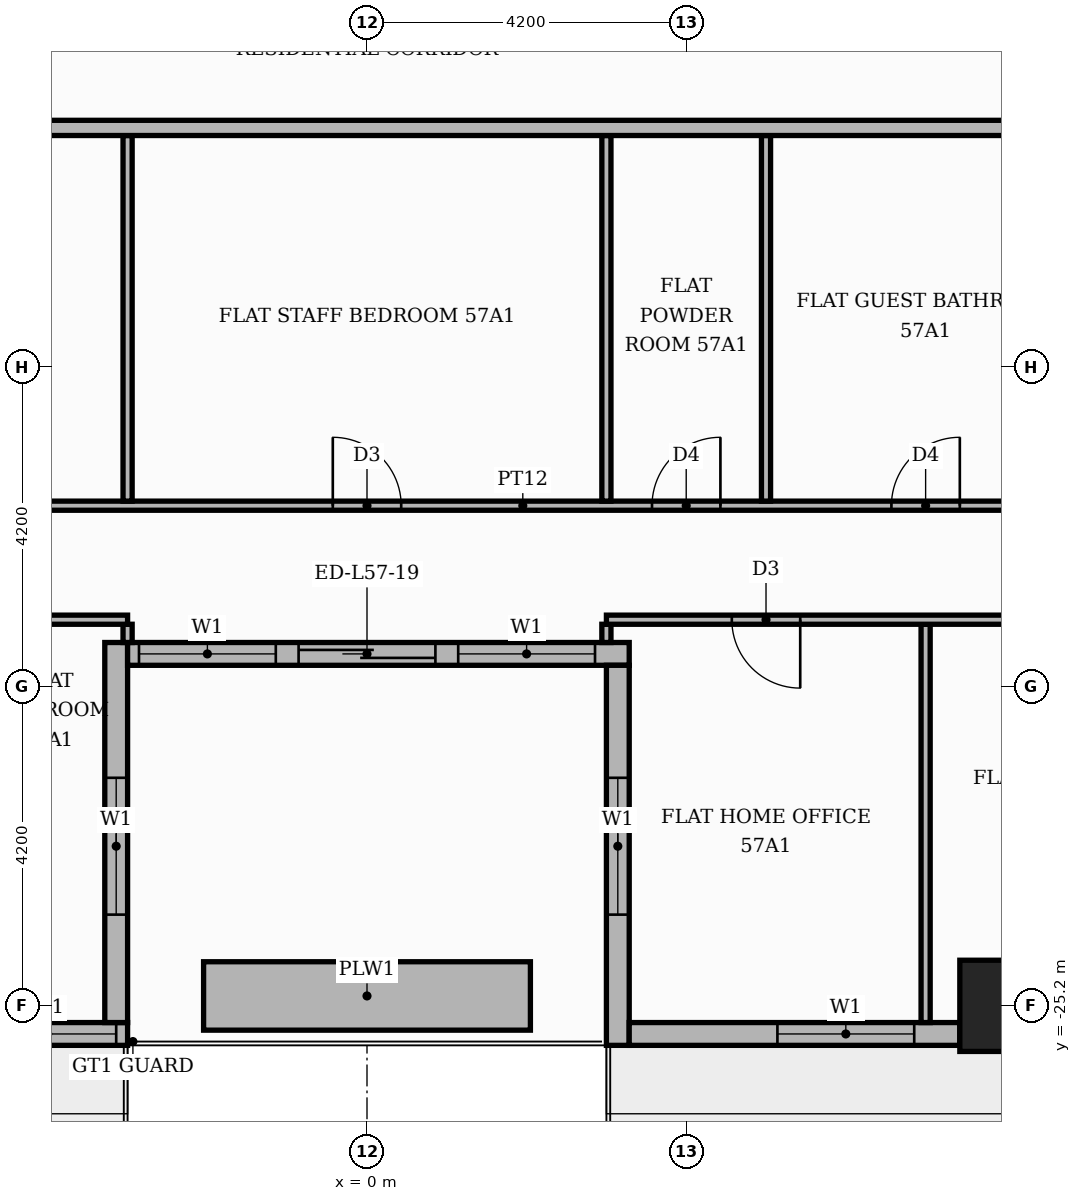
"""IFC4 building model, lengths in metres.
Left out: names, types, materials, properties, quantities, classifications, styles, units other than length and angle.
Written with IfcOpenShell. Run it as: python <this file> out.ifc"""

import sys

from ifc_helpers import new_model, si_unit, direction, frame, frame_2d, origin, origin_2d, place, context, subcontext, project, spatial, rectangle, extrude, element, fill, save


model = new_model("IFC4")
c1 = context("Model", 3, precision=1e-05, world=origin(), true_north=direction((0.0, 1.0)))
c2 = subcontext(c1, "Body", "Model", "MODEL_VIEW")
j1 = project(units=[si_unit("LENGTHUNIT", "METRE"), si_unit("PLANEANGLEUNIT", "RADIAN")], contexts=[c1])
p1 = place(None, origin())
s1 = spatial("IfcSite", under=j1, at=p1, CompositionType="ELEMENT")
p2 = place(p1, origin())
s2 = spatial("IfcBuilding", under=s1, at=p2, CompositionType="ELEMENT")
p3 = place(p2, frame((0.0, 0.0, 240.6)))
s3 = spatial("IfcBuildingStorey", under=s2, at=p3, CompositionType="ELEMENT", Elevation=240.6)
p4 = place(p3, frame((8.4, -25.2, 0.0), z_axis=(0.0, 0.0, 1.0), x_axis=(1.0, 0.0, 0.0)))
e1 = element("IfcColumn", 1, at=p4, inside=s3, PredefinedType="COLUMN", context=c2, shape_type="SweptSolid", body=[
    extrude(rectangle(XDim=1.2, YDim=1.2, at=origin_2d()), origin(), (0.0, 0.0, 1.0), 3.9),
])
p5 = place(p3, frame((-7.8, -25.57, 0.0), z_axis=(0.0, 0.0, 1.0), x_axis=(1.0, 0.0, 0.0)))
e2 = element("IfcWall", 2, at=p5, inside=s3, PredefinedType="STANDARD", context=c2, shape_type="SweptSolid", body=[
    extrude(rectangle(XDim=4.65, YDim=0.3, at=frame_2d((2.325, 0.0))), origin(), (0.0, 0.0, 1.0), 3.48),
])
p6 = place(p5, frame((0.6, 0.0, 0.9)))
e3 = element("IfcOpeningElement", 3, at=p6, cuts=e2, PredefinedType="OPENING", context=c2, shape_type="SweptSolid", body=[
    extrude(rectangle(XDim=1.8, YDim=2.1, at=frame_2d((0.9, 1.05))), frame((0.0, 0.16, 0.0), z_axis=(0.0, -1.0, 0.0), x_axis=(1.0, 0.0, 0.0)), (0.0, 0.0, 1.0), 0.32),
])
p7 = place(p5, frame((2.7, 0.0, 0.9)))
e4 = element("IfcOpeningElement", 4, at=p7, cuts=e2, PredefinedType="OPENING", context=c2, shape_type="SweptSolid", body=[
    extrude(rectangle(XDim=1.8, YDim=2.1, at=frame_2d((0.9, 1.05))), frame((0.0, 0.16, 0.0), z_axis=(0.0, -1.0, 0.0), x_axis=(1.0, 0.0, 0.0)), (0.0, 0.0, 1.0), 0.32),
])
p8 = place(p3, frame((-3.3, -25.42, 0.0), z_axis=(0.0, 0.0, 1.0), x_axis=(0.0, 1.0, 0.0)))
e5 = element("IfcWall", 5, at=p8, inside=s3, PredefinedType="STANDARD", context=c2, shape_type="SweptSolid", body=[
    extrude(rectangle(XDim=5.0, YDim=0.3, at=frame_2d((2.5, 0.0))), origin(), (0.0, 0.0, 1.0), 3.48),
])
p9 = place(p8, frame((1.42, 0.0, 0.9)))
e6 = element("IfcOpeningElement", 6, at=p9, cuts=e5, PredefinedType="OPENING", context=c2, shape_type="SweptSolid", body=[
    extrude(rectangle(XDim=1.8, YDim=2.1, at=frame_2d((0.9, 1.05))), frame((0.0, 0.16, 0.0), z_axis=(0.0, -1.0, 0.0), x_axis=(1.0, 0.0, 0.0)), (0.0, 0.0, 1.0), 0.32),
])
p10 = place(p3, frame((-3.15, -20.57, 0.0), z_axis=(0.0, 0.0, 1.0), x_axis=(1.0, 0.0, 0.0)))
e7 = element("IfcWall", 7, at=p10, inside=s3, PredefinedType="STANDARD", context=c2, shape_type="SweptSolid", body=[
    extrude(rectangle(XDim=6.6, YDim=0.3, at=frame_2d((3.3, 0.0))), origin(), (0.0, 0.0, 1.0), 3.48),
])
p11 = place(p10, frame((0.15, 0.0, 0.9)))
e8 = element("IfcOpeningElement", 8, at=p11, cuts=e7, PredefinedType="OPENING", context=c2, shape_type="SweptSolid", body=[
    extrude(rectangle(XDim=1.8, YDim=2.1, at=frame_2d((0.9, 1.05))), frame((0.0, 0.16, 0.0), z_axis=(0.0, -1.0, 0.0), x_axis=(1.0, 0.0, 0.0)), (0.0, 0.0, 1.0), 0.32),
])
p12 = place(p10, frame((2.25, 0.0, 0.0)))
e9 = element("IfcOpeningElement", 9, at=p12, cuts=e7, PredefinedType="OPENING", context=c2, shape_type="SweptSolid", body=[
    extrude(rectangle(XDim=1.8, YDim=2.4, at=frame_2d((0.9, 1.2))), frame((0.0, 0.16, 0.0), z_axis=(0.0, -1.0, 0.0), x_axis=(1.0, 0.0, 0.0)), (0.0, 0.0, 1.0), 0.32),
])
p13 = place(p10, frame((4.35, 0.0, 0.9)))
e10 = element("IfcOpeningElement", 10, at=p13, cuts=e7, PredefinedType="OPENING", context=c2, shape_type="SweptSolid", body=[
    extrude(rectangle(XDim=1.8, YDim=2.1, at=frame_2d((0.9, 1.05))), frame((0.0, 0.16, 0.0), z_axis=(0.0, -1.0, 0.0), x_axis=(1.0, 0.0, 0.0)), (0.0, 0.0, 1.0), 0.32),
])
p14 = place(p3, frame((3.3, -20.72, 0.0), z_axis=(0.0, 0.0, 1.0), x_axis=(0.0, -1.0, 0.0)))
e11 = element("IfcWall", 11, at=p14, inside=s3, PredefinedType="STANDARD", context=c2, shape_type="SweptSolid", body=[
    extrude(rectangle(XDim=5.0, YDim=0.3, at=frame_2d((2.5, 0.0))), origin(), (0.0, 0.0, 1.0), 3.48),
])
p15 = place(p14, frame((1.48, 0.0, 0.9)))
e12 = element("IfcOpeningElement", 12, at=p15, cuts=e11, PredefinedType="OPENING", context=c2, shape_type="SweptSolid", body=[
    extrude(rectangle(XDim=1.8, YDim=2.1, at=frame_2d((0.9, 1.05))), frame((0.0, 0.16, 0.0), z_axis=(0.0, -1.0, 0.0), x_axis=(1.0, 0.0, 0.0)), (0.0, 0.0, 1.0), 0.32),
])
p16 = place(p3, frame((3.45, -25.57, 0.0), z_axis=(0.0, 0.0, 1.0), x_axis=(1.0, 0.0, 0.0)))
e13 = element("IfcWall", 13, at=p16, inside=s3, PredefinedType="STANDARD", context=c2, shape_type="SweptSolid", body=[
    extrude(rectangle(XDim=4.35, YDim=0.3, at=frame_2d((2.175, 0.0))), origin(), (0.0, 0.0, 1.0), 3.48),
])
p17 = place(p16, frame((1.95, 0.0, 0.9)))
e14 = element("IfcOpeningElement", 14, at=p17, cuts=e13, PredefinedType="OPENING", context=c2, shape_type="SweptSolid", body=[
    extrude(rectangle(XDim=1.8, YDim=2.1, at=frame_2d((0.9, 1.05))), frame((0.0, 0.16, 0.0), z_axis=(0.0, -1.0, 0.0), x_axis=(1.0, 0.0, 0.0)), (0.0, 0.0, 1.0), 0.32),
])
p18 = place(p3, frame((-2.15, -25.07, 0.0), z_axis=(0.0, 0.0, 1.0), x_axis=(1.0, 0.0, 0.0)))
e15 = element("IfcWall", 15, at=p18, inside=s3, PredefinedType="MOVABLE", context=c2, shape_type="SweptSolid", body=[
    extrude(rectangle(XDim=4.3, YDim=0.9, at=frame_2d((2.15, 0.0))), origin(), (0.0, 0.0, 1.0), 0.6),
])
p19 = place(p3, frame((7.35, -25.42, 0.0), z_axis=(0.0, 0.0, 1.0), x_axis=(0.0, 1.0, 0.0)))
e16 = element("IfcWall", 16, at=p19, inside=s3, PredefinedType="PARTITIONING", context=c2, shape_type="SweptSolid", body=[
    extrude(rectangle(XDim=5.24, YDim=0.12, at=frame_2d((2.62, 0.0))), origin(), (0.0, 0.0, 1.0), 3.48),
])
for number, where, z_axis, x_axis in (
    (17, (-3.15, -20.42, 0.0), (0.0, 0.0, 1.0), (0.0, 1.0, 0.0)),
    (18, (3.15, -20.42, 0.0), (0.0, 0.0, 1.0), (0.0, 1.0, 0.0)),
):
    element("IfcWall", number, at=place(p3, frame(where, z_axis=z_axis, x_axis=x_axis)), inside=s3, PredefinedType="PARTITIONING", context=c2, shape_type="SweptSolid", body=[
        extrude(rectangle(XDim=0.24, YDim=0.12, at=frame_2d((0.12, 0.0))), origin(), (0.0, 0.0, 1.0), 3.48),
    ])
p20 = place(p3, frame((-20.719, -20.12, 0.0), z_axis=(0.0, 0.0, 1.0), x_axis=(1.0, 0.0, 0.0)))
e19 = element("IfcWall", 19, at=p20, inside=s3, PredefinedType="PARTITIONING", context=c2, shape_type="SweptSolid", body=[
    extrude(rectangle(XDim=17.569, YDim=0.12, at=frame_2d((8.785, 0.0))), origin(), (0.0, 0.0, 1.0), 3.48),
])
p21 = place(p20, frame((5.519, 0.0, 0.0)))
e20 = element("IfcOpeningElement", 20, at=p21, cuts=e19, PredefinedType="OPENING", context=c2, shape_type="SweptSolid", body=[
    extrude(rectangle(XDim=1.0, YDim=2.1, at=frame_2d((0.5, 1.05))), frame((0.0, 0.07, 0.0), z_axis=(0.0, -1.0, 0.0), x_axis=(1.0, 0.0, 0.0)), (0.0, 0.0, 1.0), 0.14),
])
p22 = place(p20, frame((9.769, 0.0, 0.0)))
e21 = element("IfcOpeningElement", 21, at=p22, cuts=e19, PredefinedType="OPENING", context=c2, shape_type="SweptSolid", body=[
    extrude(rectangle(XDim=0.9, YDim=2.1, at=frame_2d((0.45, 1.05))), frame((0.0, 0.07, 0.0), z_axis=(0.0, -1.0, 0.0), x_axis=(1.0, 0.0, 0.0)), (0.0, 0.0, 1.0), 0.14),
])
p23 = place(p3, frame((3.15, -20.12, 0.0), z_axis=(0.0, 0.0, 1.0), x_axis=(1.0, 0.0, 0.0)))
e22 = element("IfcWall", 22, at=p23, inside=s3, PredefinedType="PARTITIONING", context=c2, shape_type="SweptSolid", body=[
    extrude(rectangle(XDim=10.4, YDim=0.12, at=frame_2d((5.2, 0.0))), origin(), (0.0, 0.0, 1.0), 3.48),
])
p24 = place(p23, frame((1.65, 0.0, 0.0)))
e23 = element("IfcOpeningElement", 23, at=p24, cuts=e22, PredefinedType="OPENING", context=c2, shape_type="SweptSolid", body=[
    extrude(rectangle(XDim=0.9, YDim=2.1, at=frame_2d((0.45, 1.05))), frame((0.0, 0.07, 0.0), z_axis=(0.0, -1.0, 0.0), x_axis=(1.0, 0.0, 0.0)), (0.0, 0.0, 1.0), 0.14),
])
p25 = place(p23, frame((5.85, 0.0, 0.0)))
e24 = element("IfcOpeningElement", 24, at=p25, cuts=e22, PredefinedType="OPENING", context=c2, shape_type="SweptSolid", body=[
    extrude(rectangle(XDim=0.9, YDim=2.1, at=frame_2d((0.45, 1.05))), frame((0.0, 0.07, 0.0), z_axis=(0.0, -1.0, 0.0), x_axis=(1.0, 0.0, 0.0)), (0.0, 0.0, 1.0), 0.14),
])
p26 = place(p3, frame((-9.45, -18.62, 0.0), z_axis=(0.0, 0.0, 1.0), x_axis=(1.0, 0.0, 0.0)))
e25 = element("IfcWall", 25, at=p26, inside=s3, PredefinedType="PARTITIONING", context=c2, shape_type="SweptSolid", body=[
    extrude(rectangle(XDim=23.0, YDim=0.12, at=frame_2d((11.5, 0.0))), origin(), (0.0, 0.0, 1.0), 3.48),
])
p27 = place(p26, frame((2.7, 0.0, 0.0)))
e26 = element("IfcOpeningElement", 26, at=p27, cuts=e25, PredefinedType="OPENING", context=c2, shape_type="SweptSolid", body=[
    extrude(rectangle(XDim=0.9, YDim=2.1, at=frame_2d((0.45, 1.05))), frame((0.0, 0.07, 0.0), z_axis=(0.0, -1.0, 0.0), x_axis=(1.0, 0.0, 0.0)), (0.0, 0.0, 1.0), 0.14),
])
p28 = place(p26, frame((9.0, 0.0, 0.0)))
e27 = element("IfcOpeningElement", 27, at=p28, cuts=e25, PredefinedType="OPENING", context=c2, shape_type="SweptSolid", body=[
    extrude(rectangle(XDim=0.9, YDim=2.1, at=frame_2d((0.45, 1.05))), frame((0.0, 0.07, 0.0), z_axis=(0.0, -1.0, 0.0), x_axis=(1.0, 0.0, 0.0)), (0.0, 0.0, 1.0), 0.14),
])
p29 = place(p26, frame((13.2, 0.0, 0.0)))
e28 = element("IfcOpeningElement", 28, at=p29, cuts=e25, PredefinedType="OPENING", context=c2, shape_type="SweptSolid", body=[
    extrude(rectangle(XDim=0.9, YDim=2.1, at=frame_2d((0.45, 1.05))), frame((0.0, 0.07, 0.0), z_axis=(0.0, -1.0, 0.0), x_axis=(1.0, 0.0, 0.0)), (0.0, 0.0, 1.0), 0.14),
])
p30 = place(p26, frame((16.35, 0.0, 0.0)))
e29 = element("IfcOpeningElement", 29, at=p30, cuts=e25, PredefinedType="OPENING", context=c2, shape_type="SweptSolid", body=[
    extrude(rectangle(XDim=0.9, YDim=2.1, at=frame_2d((0.45, 1.05))), frame((0.0, 0.07, 0.0), z_axis=(0.0, -1.0, 0.0), x_axis=(1.0, 0.0, 0.0)), (0.0, 0.0, 1.0), 0.14),
])
p31 = place(p26, frame((20.55, 0.0, 0.0)))
e30 = element("IfcOpeningElement", 30, at=p31, cuts=e25, PredefinedType="OPENING", context=c2, shape_type="SweptSolid", body=[
    extrude(rectangle(XDim=0.9, YDim=2.1, at=frame_2d((0.45, 1.05))), frame((0.0, 0.07, 0.0), z_axis=(0.0, -1.0, 0.0), x_axis=(1.0, 0.0, 0.0)), (0.0, 0.0, 1.0), 0.14),
])
for number, where, z_axis, x_axis in (
    (31, (-3.15, -18.56, 0.0), (0.0, 0.0, 1.0), (0.0, 1.0, 0.0)),
    (32, (3.15, -18.56, 0.0), (0.0, 0.0, 1.0), (0.0, 1.0, 0.0)),
    (33, (5.25, -18.56, 0.0), (0.0, 0.0, 1.0), (0.0, 1.0, 0.0)),
):
    element("IfcWall", number, at=place(p3, frame(where, z_axis=z_axis, x_axis=x_axis)), inside=s3, PredefinedType="PARTITIONING", context=c2, shape_type="SweptSolid", body=[
        extrude(rectangle(XDim=4.81, YDim=0.12, at=frame_2d((2.405, 0.0))), origin(), (0.0, 0.0, 1.0), 3.48),
    ])
p32 = place(p3, frame((-25.42, -13.65, 0.0), z_axis=(0.0, 0.0, 1.0), x_axis=(1.0, 0.0, 0.0)))
e34 = element("IfcWall", 34, at=p32, inside=s3, PredefinedType="PARTITIONING", context=c2, shape_type="SweptSolid", body=[
    extrude(rectangle(XDim=39.07, YDim=0.2, at=frame_2d((19.535, 0.0))), origin(), (0.0, 0.0, 1.0), 3.48),
])
p33 = place(p32, frame((13.32, 0.0, 0.0)))
e35 = element("IfcOpeningElement", 35, at=p33, cuts=e34, PredefinedType="OPENING", context=c2, shape_type="SweptSolid", body=[
    extrude(rectangle(XDim=1.1, YDim=2.4, at=frame_2d((0.55, 1.2))), frame((0.0, 0.11, 0.0), z_axis=(0.0, -1.0, 0.0), x_axis=(1.0, 0.0, 0.0)), (0.0, 0.0, 1.0), 0.22),
])
p34 = place(p7, origin())
e36 = element("IfcWindow", 36, at=p34, inside=s3, PartitioningType="SINGLE_PANEL", PredefinedType="WINDOW", context=c2, shape_type="SweptSolid", body=[
    extrude(rectangle(XDim=1.8, YDim=2.1, at=frame_2d((0.9, 1.05))), frame((0.0, 0.03, 0.0), z_axis=(0.0, -1.0, 0.0), x_axis=(1.0, 0.0, 0.0)), (0.0, 0.0, 1.0), 0.06),
])
fill(e4, e36)
p35 = place(p9, origin())
e37 = element("IfcWindow", 37, at=p35, inside=s3, PartitioningType="SINGLE_PANEL", PredefinedType="WINDOW", context=c2, shape_type="SweptSolid", body=[
    extrude(rectangle(XDim=1.8, YDim=2.1, at=frame_2d((0.9, 1.05))), frame((0.0, 0.03, 0.0), z_axis=(0.0, -1.0, 0.0), x_axis=(1.0, 0.0, 0.0)), (0.0, 0.0, 1.0), 0.06),
])
fill(e6, e37)
p36 = place(p11, origin())
e38 = element("IfcWindow", 38, at=p36, inside=s3, PartitioningType="SINGLE_PANEL", PredefinedType="WINDOW", context=c2, shape_type="SweptSolid", body=[
    extrude(rectangle(XDim=1.8, YDim=2.1, at=frame_2d((0.9, 1.05))), frame((0.0, 0.03, 0.0), z_axis=(0.0, -1.0, 0.0), x_axis=(1.0, 0.0, 0.0)), (0.0, 0.0, 1.0), 0.06),
])
fill(e8, e38)
p37 = place(p12, origin())
e39 = element("IfcDoor", 39, at=p37, inside=s3, OperationType="SLIDING_TO_LEFT", PredefinedType="DOOR", context=c2, shape_type="SweptSolid", body=[
    extrude(rectangle(XDim=1.8, YDim=2.4, at=frame_2d((0.9, 1.2))), frame((0.0, 0.025, 0.0), z_axis=(0.0, -1.0, 0.0), x_axis=(1.0, 0.0, 0.0)), (0.0, 0.0, 1.0), 0.05),
])
fill(e9, e39)
p38 = place(p13, origin())
e40 = element("IfcWindow", 40, at=p38, inside=s3, PartitioningType="SINGLE_PANEL", PredefinedType="WINDOW", context=c2, shape_type="SweptSolid", body=[
    extrude(rectangle(XDim=1.8, YDim=2.1, at=frame_2d((0.9, 1.05))), frame((0.0, 0.03, 0.0), z_axis=(0.0, -1.0, 0.0), x_axis=(1.0, 0.0, 0.0)), (0.0, 0.0, 1.0), 0.06),
])
fill(e10, e40)
p39 = place(p15, origin())
e41 = element("IfcWindow", 41, at=p39, inside=s3, PartitioningType="SINGLE_PANEL", PredefinedType="WINDOW", context=c2, shape_type="SweptSolid", body=[
    extrude(rectangle(XDim=1.8, YDim=2.1, at=frame_2d((0.9, 1.05))), frame((0.0, 0.03, 0.0), z_axis=(0.0, -1.0, 0.0), x_axis=(1.0, 0.0, 0.0)), (0.0, 0.0, 1.0), 0.06),
])
fill(e12, e41)
p40 = place(p17, origin())
e42 = element("IfcWindow", 42, at=p40, inside=s3, PartitioningType="SINGLE_PANEL", PredefinedType="WINDOW", context=c2, shape_type="SweptSolid", body=[
    extrude(rectangle(XDim=1.8, YDim=2.1, at=frame_2d((0.9, 1.05))), frame((0.0, 0.03, 0.0), z_axis=(0.0, -1.0, 0.0), x_axis=(1.0, 0.0, 0.0)), (0.0, 0.0, 1.0), 0.06),
])
fill(e14, e42)
p41 = place(p28, origin())
e43 = element("IfcDoor", 43, at=p41, inside=s3, OperationType="SINGLE_SWING_LEFT", PredefinedType="DOOR", context=c2, shape_type="SweptSolid", body=[
    extrude(rectangle(XDim=0.9, YDim=2.1, at=frame_2d((0.45, 1.05))), frame((0.0, 0.025, 0.0), z_axis=(0.0, -1.0, 0.0), x_axis=(1.0, 0.0, 0.0)), (0.0, 0.0, 1.0), 0.05),
])
fill(e27, e43)
p42 = place(p29, origin())
e44 = element("IfcDoor", 44, at=p42, inside=s3, OperationType="SINGLE_SWING_RIGHT", PredefinedType="DOOR", context=c2, shape_type="SweptSolid", body=[
    extrude(rectangle(XDim=0.9, YDim=2.1, at=frame_2d((0.45, 1.05))), frame((0.0, 0.025, 0.0), z_axis=(0.0, -1.0, 0.0), x_axis=(1.0, 0.0, 0.0)), (0.0, 0.0, 1.0), 0.05),
])
fill(e28, e44)
p43 = place(p30, origin())
e45 = element("IfcDoor", 45, at=p43, inside=s3, OperationType="SINGLE_SWING_RIGHT", PredefinedType="DOOR", context=c2, shape_type="SweptSolid", body=[
    extrude(rectangle(XDim=0.9, YDim=2.1, at=frame_2d((0.45, 1.05))), frame((0.0, 0.025, 0.0), z_axis=(0.0, -1.0, 0.0), x_axis=(1.0, 0.0, 0.0)), (0.0, 0.0, 1.0), 0.05),
])
fill(e29, e45)
p44 = place(p24, frame((0.9, 0.0, 0.0), z_axis=(0.0, 0.0, 1.0), x_axis=(-1.0, 0.0, 0.0)))
e46 = element("IfcDoor", 46, at=p44, inside=s3, OperationType="SINGLE_SWING_RIGHT", PredefinedType="DOOR", context=c2, shape_type="SweptSolid", body=[
    extrude(rectangle(XDim=0.9, YDim=2.1, at=frame_2d((0.45, 1.05))), frame((0.0, 0.025, 0.0), z_axis=(0.0, -1.0, 0.0), x_axis=(1.0, 0.0, 0.0)), (0.0, 0.0, 1.0), 0.05),
])
fill(e23, e46)
save(model, sys.argv[1])
